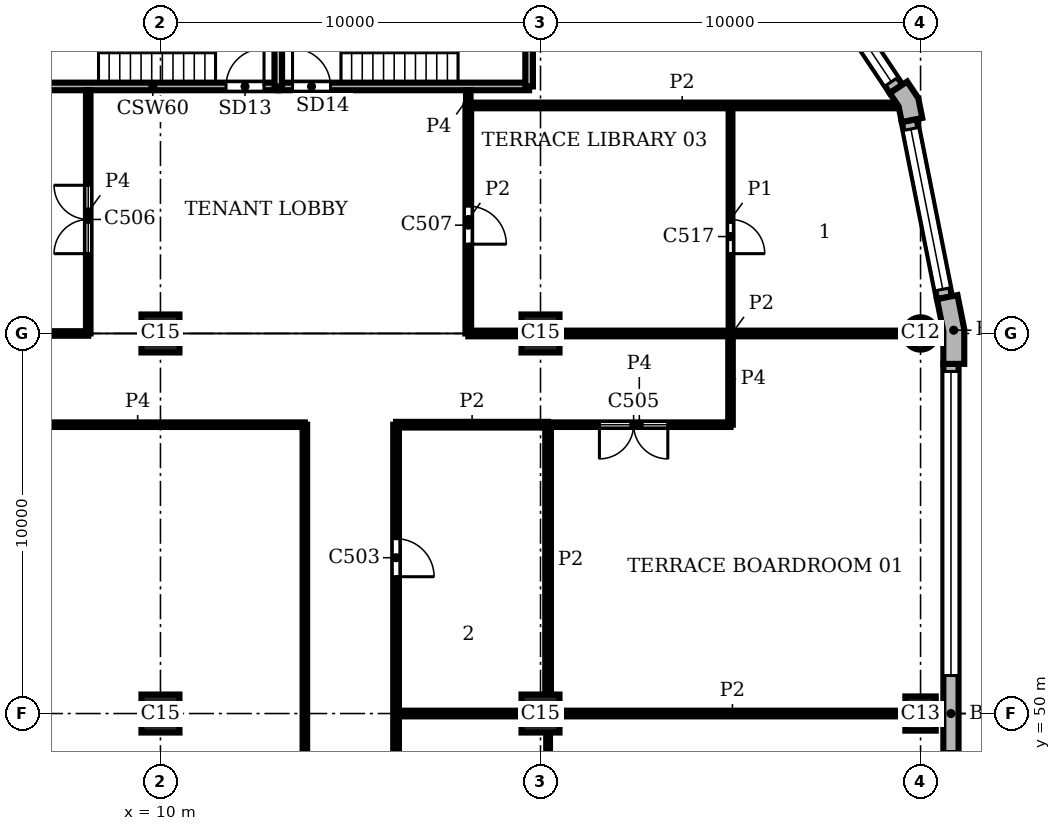
"""IFC4 building model, lengths in metres.
Left out: names, types, materials, properties, quantities, classifications, styles, units other than length and angle.
Written with IfcOpenShell. Run it as: python <this file> out.ifc"""

import sys

from ifc_helpers import new_model, si_unit, direction, frame, frame_2d, origin, origin_2d, place, context, subcontext, project, spatial, polyline, rectangle, circle, outline, extrude, element, fill, save


model = new_model("IFC4")
c1 = context("Model", 3, precision=1e-05, world=origin(), true_north=direction((0.0, 1.0)))
c2 = subcontext(c1, "Body", "Model", "MODEL_VIEW")
j1 = project(units=[si_unit("LENGTHUNIT", "METRE"), si_unit("PLANEANGLEUNIT", "RADIAN")], contexts=[c1])
p1 = place(None, origin())
s1 = spatial("IfcSite", under=j1, at=p1, CompositionType="ELEMENT")
p2 = place(p1, origin())
s2 = spatial("IfcBuilding", under=s1, at=p2, CompositionType="ELEMENT")
p3 = place(p2, frame((0.0, 0.0, 290.4)))
s3 = spatial("IfcBuildingStorey", under=s2, at=p3, CompositionType="ELEMENT", Elevation=290.4)
p4 = place(p3, frame((30.0, 50.0, 0.0), z_axis=(0.0, 0.0, 1.0), x_axis=(0.0, 1.0, 0.0)))
e1 = element("IfcColumn", 1, at=p4, inside=s3, PredefinedType="COLUMN", context=c2, shape_type="SweptSolid", body=[
    extrude(rectangle(XDim=0.9, YDim=0.8, at=origin_2d()), origin(), (0.0, 0.0, 1.0), 3.9),
])
p5 = place(p3, frame((30.0, 60.0, 0.0), z_axis=(0.0, 0.0, 1.0), x_axis=(1.0, 0.0, 0.0)))
e2 = element("IfcColumn", 2, at=p5, inside=s3, PredefinedType="COLUMN", context=c2, shape_type="SweptSolid", body=[
    extrude(circle(Radius=0.425, at=origin_2d()), origin(), (0.0, 0.0, 1.0), 3.9),
])
for number, where, z_axis, x_axis in (
    (3, (10.0, 50.0, 0.0), (0.0, 0.0, 1.0), (1.0, 0.0, 0.0)),
    (4, (10.0, 60.0, 0.0), (0.0, 0.0, 1.0), (1.0, 0.0, 0.0)),
    (5, (20.0, 50.0, 0.0), (0.0, 0.0, 1.0), (1.0, 0.0, 0.0)),
    (6, (20.0, 60.0, 0.0), (0.0, 0.0, 1.0), (1.0, 0.0, 0.0)),
):
    element("IfcColumn", number, at=place(p3, frame(where, z_axis=z_axis, x_axis=x_axis)), inside=s3, PredefinedType="COLUMN", context=c2, shape_type="SweptSolid", body=[
        extrude(rectangle(XDim=1.0, YDim=1.0, at=origin_2d()), origin(), (0.0, 0.0, 1.0), 3.9),
    ])
p6 = place(p3, origin())
e7 = element("IfcWall", 7, at=p6, inside=s3, PredefinedType="SOLIDWALL", context=c2, shape_type="SweptSolid", body=[
    extrude(outline(polyline([(31.0, 59.2), (31.15, 59.2), (31.15, 60.113), (30.972, 61.009), (30.825, 60.98), (30.432, 60.902), (30.6, 60.059), (30.6, 59.2), (31.0, 59.2)])), origin(), (0.0, 0.0, 1.0), 3.9),
])
e8 = element("IfcWall", 8, at=p6, inside=s3, PredefinedType="SOLIDWALL", context=c2, shape_type="SweptSolid", body=[
    extrude(outline(polyline([(29.897, 65.641), (30.045, 65.67), (29.941, 66.189), (29.648, 66.629), (29.523, 66.545), (29.19, 66.323), (29.423, 65.974), (29.505, 65.563), (29.897, 65.641)])), origin(), (0.0, 0.0, 1.0), 3.9),
])
p7 = place(p3, frame((30.8, 40.8, 0.0), z_axis=(0.0, 0.0, 1.0), x_axis=(0.0, 1.0, 0.0)))
e9 = element("IfcWall", 9, at=p7, inside=s3, PredefinedType="SOLIDWALL", context=c2, shape_type="SweptSolid", body=[
    extrude(rectangle(XDim=18.4, YDim=0.4, at=frame_2d((9.2, 0.0))), origin(), (0.0, 0.0, 1.0), 3.9),
])
p8 = place(p7, frame((0.2, 0.0, 0.9)))
e10 = element("IfcOpeningElement", 10, at=p8, cuts=e9, PredefinedType="OPENING", context=c2, shape_type="SweptSolid", body=[
    extrude(rectangle(XDim=8.0, YDim=2.35, at=frame_2d((4.0, 1.175))), frame((0.0, 0.21, 0.0), z_axis=(0.0, -1.0, 0.0), x_axis=(1.0, 0.0, 0.0)), (0.0, 0.0, 1.0), 0.42),
])
p9 = place(p7, frame((10.2, 0.0, 0.9)))
e11 = element("IfcOpeningElement", 11, at=p9, cuts=e9, PredefinedType="OPENING", context=c2, shape_type="SweptSolid", body=[
    extrude(rectangle(XDim=8.0, YDim=2.35, at=frame_2d((4.0, 1.175))), frame((0.0, 0.21, 0.0), z_axis=(0.0, -1.0, 0.0), x_axis=(1.0, 0.0, 0.0)), (0.0, 0.0, 1.0), 0.42),
])
p10 = place(p3, frame((30.629, 60.941, 0.0), z_axis=(0.0, 0.0, 1.0), x_axis=(-0.195098533057, 0.98078364709, 0.0)))
e12 = element("IfcWall", 12, at=p10, inside=s3, PredefinedType="SOLIDWALL", context=c2, shape_type="SweptSolid", body=[
    extrude(rectangle(XDim=4.753, YDim=0.4, at=frame_2d((2.376, 0.0))), origin(), (0.0, 0.0, 1.0), 3.9),
])
p11 = place(p10, frame((0.226, 0.0, 0.9)))
e13 = element("IfcOpeningElement", 13, at=p11, cuts=e12, PredefinedType="OPENING", context=c2, shape_type="SweptSolid", body=[
    extrude(rectangle(XDim=4.3, YDim=2.35, at=frame_2d((2.15, 1.175))), frame((0.0, 0.21, 0.0), z_axis=(0.0, -1.0, 0.0), x_axis=(1.0, 0.0, 0.0)), (0.0, 0.0, 1.0), 0.42),
])
p12 = place(p3, frame((29.357, 66.434, 0.0), z_axis=(0.0, 0.0, 1.0), x_axis=(-0.555541552266, 0.831488775454, 0.0)))
e14 = element("IfcWall", 14, at=p12, inside=s3, PredefinedType="SOLIDWALL", context=c2, shape_type="SweptSolid", body=[
    extrude(rectangle(XDim=4.753, YDim=0.4, at=frame_2d((2.376, 0.0))), origin(), (0.0, 0.0, 1.0), 3.9),
])
p13 = place(p12, frame((0.226, 0.0, 0.9)))
e15 = element("IfcOpeningElement", 15, at=p13, cuts=e14, PredefinedType="OPENING", context=c2, shape_type="SweptSolid", body=[
    extrude(rectangle(XDim=4.3, YDim=2.35, at=frame_2d((2.15, 1.175))), frame((0.0, 0.21, 0.0), z_axis=(0.0, -1.0, 0.0), x_axis=(1.0, 0.0, 0.0)), (0.0, 0.0, 1.0), 0.42),
])
p14 = place(p3, frame((6.5, 66.5, 0.0), z_axis=(0.0, 0.0, 1.0), x_axis=(1.0, 0.0, 0.0)))
e16 = element("IfcWall", 16, at=p14, inside=s3, PredefinedType="SHEAR", context=c2, shape_type="SweptSolid", body=[
    extrude(rectangle(XDim=6.6, YDim=0.2, at=frame_2d((3.3, 0.0))), origin(), (0.0, 0.0, 1.0), 3.58),
])
p15 = place(p14, frame((5.225, 0.0, 0.0)))
e17 = element("IfcOpeningElement", 17, at=p15, cuts=e16, PredefinedType="OPENING", context=c2, shape_type="SweptSolid", body=[
    extrude(rectangle(XDim=1.0, YDim=2.1, at=frame_2d((0.5, 1.05))), frame((0.0, 0.11, 0.0), z_axis=(0.0, -1.0, 0.0), x_axis=(1.0, 0.0, 0.0)), (0.0, 0.0, 1.0), 0.22),
])
p16 = place(p3, frame((13.1, 66.5, 0.0), z_axis=(0.0, 0.0, 1.0), x_axis=(1.0, 0.0, 0.0)))
e18 = element("IfcWall", 18, at=p16, inside=s3, PredefinedType="SHEAR", context=c2, shape_type="SweptSolid", body=[
    extrude(rectangle(XDim=6.6, YDim=0.2, at=frame_2d((3.3, 0.0))), origin(), (0.0, 0.0, 1.0), 3.58),
])
p17 = place(p16, frame((0.375, 0.0, 0.0)))
e19 = element("IfcOpeningElement", 19, at=p17, cuts=e18, PredefinedType="OPENING", context=c2, shape_type="SweptSolid", body=[
    extrude(rectangle(XDim=1.0, YDim=2.1, at=frame_2d((0.5, 1.05))), frame((0.0, 0.11, 0.0), z_axis=(0.0, -1.0, 0.0), x_axis=(1.0, 0.0, 0.0)), (0.0, 0.0, 1.0), 0.22),
])
for number, where, z_axis, x_axis in (
    (20, (13.1, 66.5, 0.0), (0.0, 0.0, 1.0), (0.0, 1.0, 0.0)),
    (21, (19.7, 66.5, 0.0), (0.0, 0.0, 1.0), (0.0, 1.0, 0.0)),
):
    element("IfcWall", number, at=place(p3, frame(where, z_axis=z_axis, x_axis=x_axis)), inside=s3, PredefinedType="SHEAR", context=c2, shape_type="SweptSolid", body=[
        extrude(rectangle(XDim=3.3, YDim=0.2, at=frame_2d((1.65, 0.0))), origin(), (0.0, 0.0, 1.0), 3.58),
    ])
p18 = place(p3, frame((20.2, 40.5, 0.0), z_axis=(0.0, 0.0, 1.0), x_axis=(0.0, 1.0, 0.0)))
e22 = element("IfcWall", 22, at=p18, inside=s3, PredefinedType="PARTITIONING", context=c2, shape_type="SweptSolid", body=[
    extrude(rectangle(XDim=9.0, YDim=0.1, at=frame_2d((4.5, 0.0))), origin(), (0.0, 0.0, 1.0), 3.58),
])
p19 = place(p18, frame((4.9, 0.0, 0.0)))
e23 = element("IfcOpeningElement", 23, at=p19, cuts=e22, PredefinedType="OPENING", context=c2, shape_type="SweptSolid", body=[
    extrude(rectangle(XDim=0.9, YDim=2.1, at=frame_2d((0.45, 1.05))), frame((0.0, 0.06, 0.0), z_axis=(0.0, -1.0, 0.0), x_axis=(1.0, 0.0, 0.0)), (0.0, 0.0, 1.0), 0.12),
])
p20 = place(p3, frame((25.0, 60.0, 0.0), z_axis=(0.0, 0.0, 1.0), x_axis=(0.0, 1.0, 0.0)))
e24 = element("IfcWall", 24, at=p20, inside=s3, PredefinedType="PARTITIONING", context=c2, shape_type="SweptSolid", body=[
    extrude(rectangle(XDim=6.0, YDim=0.1, at=frame_2d((3.0, 0.0))), origin(), (0.0, 0.0, 1.0), 3.58),
])
p21 = place(p20, frame((2.1, 0.0, 0.0)))
e25 = element("IfcOpeningElement", 25, at=p21, cuts=e24, PredefinedType="OPENING", context=c2, shape_type="SweptSolid", body=[
    extrude(rectangle(XDim=0.9, YDim=2.1, at=frame_2d((0.45, 1.05))), frame((0.0, 0.06, 0.0), z_axis=(0.0, -1.0, 0.0), x_axis=(1.0, 0.0, 0.0)), (0.0, 0.0, 1.0), 0.12),
])
p22 = place(p3, frame((16.2, 33.2, 0.0), z_axis=(0.0, 0.0, 1.0), x_axis=(0.0, 1.0, 0.0)))
e26 = element("IfcWall", 26, at=p22, inside=s3, PredefinedType="PARTITIONING", context=c2, shape_type="SweptSolid", body=[
    extrude(rectangle(XDim=24.4, YDim=0.15, at=frame_2d((12.2, 0.0))), origin(), (0.0, 0.0, 1.0), 3.58),
])
p23 = place(p22, frame((20.4, 0.0, 0.0)))
e27 = element("IfcOpeningElement", 27, at=p23, cuts=e26, PredefinedType="OPENING", context=c2, shape_type="SweptSolid", body=[
    extrude(rectangle(XDim=1.0, YDim=2.1, at=frame_2d((0.5, 1.05))), frame((0.0, 0.085, 0.0), z_axis=(0.0, -1.0, 0.0), x_axis=(1.0, 0.0, 0.0)), (0.0, 0.0, 1.0), 0.17),
])
p24 = place(p22, frame((11.65, 0.0, 0.0)))
e28 = element("IfcOpeningElement", 28, at=p24, cuts=e26, PredefinedType="OPENING", context=c2, shape_type="SweptSolid", body=[
    extrude(rectangle(XDim=1.0, YDim=2.1, at=frame_2d((0.5, 1.05))), frame((0.0, 0.085, 0.0), z_axis=(0.0, -1.0, 0.0), x_axis=(1.0, 0.0, 0.0)), (0.0, 0.0, 1.0), 0.17),
])
p25 = place(p3, frame((18.1, 60.0, 0.0), z_axis=(0.0, 0.0, 1.0), x_axis=(0.0, 1.0, 0.0)))
e29 = element("IfcWall", 29, at=p25, inside=s3, PredefinedType="PARTITIONING", context=c2, shape_type="SweptSolid", body=[
    extrude(rectangle(XDim=6.0, YDim=0.15, at=frame_2d((3.0, 0.0))), origin(), (0.0, 0.0, 1.0), 3.58),
])
p26 = place(p25, frame((2.35, 0.0, 0.0)))
e30 = element("IfcOpeningElement", 30, at=p26, cuts=e29, PredefinedType="OPENING", context=c2, shape_type="SweptSolid", body=[
    extrude(rectangle(XDim=1.0, YDim=2.1, at=frame_2d((0.5, 1.05))), frame((0.0, 0.085, 0.0), z_axis=(0.0, -1.0, 0.0), x_axis=(1.0, 0.0, 0.0)), (0.0, 0.0, 1.0), 0.17),
])
p27 = place(p3, frame((20.2, 50.5, 0.0), z_axis=(0.0, 0.0, 1.0), x_axis=(0.0, 1.0, 0.0)))
e31 = element("IfcWall", 31, at=p27, inside=s3, PredefinedType="PARTITIONING", context=c2, shape_type="SweptSolid", body=[
    extrude(rectangle(XDim=7.1, YDim=0.15, at=frame_2d((3.55, 0.0))), origin(), (0.0, 0.0, 1.0), 3.58),
])
p28 = place(p3, frame((16.2, 50.0, 0.0), z_axis=(0.0, 0.0, 1.0), x_axis=(1.0, 0.0, 0.0)))
e32 = element("IfcWall", 32, at=p28, inside=s3, PredefinedType="PARTITIONING", context=c2, shape_type="SweptSolid", body=[
    extrude(rectangle(XDim=3.3, YDim=0.15, at=frame_2d((1.65, 0.0))), origin(), (0.0, 0.0, 1.0), 3.58),
])
p29 = place(p3, frame((20.5, 50.0, 0.0), z_axis=(0.0, 0.0, 1.0), x_axis=(1.0, 0.0, 0.0)))
e33 = element("IfcWall", 33, at=p29, inside=s3, PredefinedType="PARTITIONING", context=c2, shape_type="SweptSolid", body=[
    extrude(rectangle(XDim=9.1, YDim=0.15, at=frame_2d((4.55, 0.0))), origin(), (0.0, 0.0, 1.0), 3.58),
])
p30 = place(p3, frame((16.2, 57.6, 0.0), z_axis=(0.0, 0.0, 1.0), x_axis=(1.0, 0.0, 0.0)))
e34 = element("IfcWall", 34, at=p30, inside=s3, PredefinedType="PARTITIONING", context=c2, shape_type="SweptSolid", body=[
    extrude(rectangle(XDim=4.0, YDim=0.15, at=frame_2d((2.0, 0.0))), origin(), (0.0, 0.0, 1.0), 3.58),
])
p31 = place(p3, frame((18.1, 60.0, 0.0), z_axis=(0.0, 0.0, 1.0), x_axis=(1.0, 0.0, 0.0)))
e35 = element("IfcWall", 35, at=p31, inside=s3, PredefinedType="PARTITIONING", context=c2, shape_type="SweptSolid", body=[
    extrude(rectangle(XDim=1.4, YDim=0.15, at=frame_2d((0.7, 0.0))), origin(), (0.0, 0.0, 1.0), 3.58),
])
p32 = place(p3, frame((20.5, 60.0, 0.0), z_axis=(0.0, 0.0, 1.0), x_axis=(1.0, 0.0, 0.0)))
e36 = element("IfcWall", 36, at=p32, inside=s3, PredefinedType="PARTITIONING", context=c2, shape_type="SweptSolid", body=[
    extrude(rectangle(XDim=9.075, YDim=0.15, at=frame_2d((4.538, 0.0))), origin(), (0.0, 0.0, 1.0), 3.58),
])
p33 = place(p3, frame((18.1, 66.0, 0.0), z_axis=(0.0, 0.0, 1.0), x_axis=(1.0, 0.0, 0.0)))
e37 = element("IfcWall", 37, at=p33, inside=s3, PredefinedType="PARTITIONING", context=c2, shape_type="SweptSolid", body=[
    extrude(rectangle(XDim=11.256, YDim=0.15, at=frame_2d((5.628, 0.0))), origin(), (0.0, 0.0, 1.0), 3.58),
])
p34 = place(p3, frame((8.1, 60.0, 0.0), z_axis=(0.0, 0.0, 1.0), x_axis=(0.0, 1.0, 0.0)))
e38 = element("IfcWall", 38, at=p34, inside=s3, PredefinedType="PARTITIONING", context=c2, shape_type="SweptSolid", body=[
    extrude(rectangle(XDim=6.4, YDim=0.12, at=frame_2d((3.2, 0.0))), origin(), (0.0, 0.0, 1.0), 3.58),
])
p35 = place(p34, frame((2.1, 0.0, 0.0)))
e39 = element("IfcOpeningElement", 39, at=p35, cuts=e38, PredefinedType="OPENING", context=c2, shape_type="SweptSolid", body=[
    extrude(rectangle(XDim=1.8, YDim=2.1, at=frame_2d((0.9, 1.05))), frame((0.0, 0.07, 0.0), z_axis=(0.0, -1.0, 0.0), x_axis=(1.0, 0.0, 0.0)), (0.0, 0.0, 1.0), 0.14),
])
p36 = place(p3, frame((13.8, 30.8, 0.0), z_axis=(0.0, 0.0, 1.0), x_axis=(0.0, 1.0, 0.0)))
e40 = element("IfcWall", 40, at=p36, inside=s3, PredefinedType="PARTITIONING", context=c2, shape_type="SweptSolid", body=[
    extrude(rectangle(XDim=26.8, YDim=0.12, at=frame_2d((13.4, 0.0))), origin(), (0.0, 0.0, 1.0), 3.58),
])
p37 = place(p36, frame((12.1, 0.0, 0.0)))
e41 = element("IfcOpeningElement", 41, at=p37, cuts=e40, PredefinedType="OPENING", context=c2, shape_type="SweptSolid", body=[
    extrude(rectangle(XDim=1.8, YDim=2.1, at=frame_2d((0.9, 1.05))), frame((0.0, 0.07, 0.0), z_axis=(0.0, -1.0, 0.0), x_axis=(1.0, 0.0, 0.0)), (0.0, 0.0, 1.0), 0.14),
])
p38 = place(p3, frame((18.1, 66.0, 0.0), z_axis=(0.0, 0.0, 1.0), x_axis=(0.0, 1.0, 0.0)))
e42 = element("IfcWall", 42, at=p38, inside=s3, PredefinedType="PARTITIONING", context=c2, shape_type="SweptSolid", body=[
    extrude(rectangle(XDim=0.4, YDim=0.12, at=frame_2d((0.2, 0.0))), origin(), (0.0, 0.0, 1.0), 3.58),
])
p39 = place(p3, frame((25.0, 57.6, 0.0), z_axis=(0.0, 0.0, 1.0), x_axis=(0.0, 1.0, 0.0)))
e43 = element("IfcWall", 43, at=p39, inside=s3, PredefinedType="PARTITIONING", context=c2, shape_type="SweptSolid", body=[
    extrude(rectangle(XDim=2.4, YDim=0.12, at=frame_2d((1.2, 0.0))), origin(), (0.0, 0.0, 1.0), 3.58),
])
p40 = place(p3, frame((5.0, 57.6, 0.0), z_axis=(0.0, 0.0, 1.0), x_axis=(1.0, 0.0, 0.0)))
e44 = element("IfcWall", 44, at=p40, inside=s3, PredefinedType="PARTITIONING", context=c2, shape_type="SweptSolid", body=[
    extrude(rectangle(XDim=8.8, YDim=0.12, at=frame_2d((4.4, 0.0))), origin(), (0.0, 0.0, 1.0), 3.58),
])
p41 = place(p3, frame((20.2, 57.6, 0.0), z_axis=(0.0, 0.0, 1.0), x_axis=(1.0, 0.0, 0.0)))
e45 = element("IfcWall", 45, at=p41, inside=s3, PredefinedType="PARTITIONING", context=c2, shape_type="SweptSolid", body=[
    extrude(rectangle(XDim=4.8, YDim=0.12, at=frame_2d((2.4, 0.0))), origin(), (0.0, 0.0, 1.0), 3.58),
])
p42 = place(p41, frame((1.35, 0.0, 0.0)))
e46 = element("IfcOpeningElement", 46, at=p42, cuts=e45, PredefinedType="OPENING", context=c2, shape_type="SweptSolid", body=[
    extrude(rectangle(XDim=1.8, YDim=2.1, at=frame_2d((0.9, 1.05))), frame((0.0, 0.07, 0.0), z_axis=(0.0, -1.0, 0.0), x_axis=(1.0, 0.0, 0.0)), (0.0, 0.0, 1.0), 0.14),
])
p43 = place(p3, frame((5.0, 60.0, 0.0), z_axis=(0.0, 0.0, 1.0), x_axis=(1.0, 0.0, 0.0)))
e47 = element("IfcWall", 47, at=p43, inside=s3, PredefinedType="PARTITIONING", context=c2, shape_type="SweptSolid", body=[
    extrude(rectangle(XDim=3.1, YDim=0.12, at=frame_2d((1.55, 0.0))), origin(), (0.0, 0.0, 1.0), 3.58),
])
p44 = place(p9, origin())
e48 = element("IfcWindow", 48, at=p44, inside=s3, PartitioningType="SINGLE_PANEL", PredefinedType="WINDOW", context=c2, shape_type="SweptSolid", body=[
    extrude(rectangle(XDim=8.0, YDim=2.35, at=frame_2d((4.0, 1.175))), frame((0.0, 0.16, 0.0), z_axis=(0.0, -1.0, 0.0), x_axis=(1.0, 0.0, 0.0)), (0.0, 0.0, 1.0), 0.06),
])
fill(e11, e48)
p45 = place(p11, origin())
e49 = element("IfcWindow", 49, at=p45, inside=s3, PartitioningType="SINGLE_PANEL", PredefinedType="WINDOW", context=c2, shape_type="SweptSolid", body=[
    extrude(rectangle(XDim=4.3, YDim=2.35, at=frame_2d((2.15, 1.175))), frame((0.0, 0.16, 0.0), z_axis=(0.0, -1.0, 0.0), x_axis=(1.0, 0.0, 0.0)), (0.0, 0.0, 1.0), 0.06),
])
fill(e13, e49)
p46 = place(p13, origin())
e50 = element("IfcWindow", 50, at=p46, inside=s3, PartitioningType="SINGLE_PANEL", PredefinedType="WINDOW", context=c2, shape_type="SweptSolid", body=[
    extrude(rectangle(XDim=4.3, YDim=2.35, at=frame_2d((2.15, 1.175))), frame((0.0, 0.16, 0.0), z_axis=(0.0, -1.0, 0.0), x_axis=(1.0, 0.0, 0.0)), (0.0, 0.0, 1.0), 0.06),
])
fill(e15, e50)
p47 = place(p15, origin())
e51 = element("IfcDoor", 51, at=p47, inside=s3, OperationType="SINGLE_SWING_RIGHT", PredefinedType="DOOR", context=c2, shape_type="SweptSolid", body=[
    extrude(rectangle(XDim=1.0, YDim=2.1, at=frame_2d((0.5, 1.05))), frame((0.0, 0.025, 0.0), z_axis=(0.0, -1.0, 0.0), x_axis=(1.0, 0.0, 0.0)), (0.0, 0.0, 1.0), 0.05),
])
fill(e17, e51)
p48 = place(p17, origin())
e52 = element("IfcDoor", 52, at=p48, inside=s3, OperationType="SINGLE_SWING_LEFT", PredefinedType="DOOR", context=c2, shape_type="SweptSolid", body=[
    extrude(rectangle(XDim=1.0, YDim=2.1, at=frame_2d((0.5, 1.05))), frame((0.0, 0.025, 0.0), z_axis=(0.0, -1.0, 0.0), x_axis=(1.0, 0.0, 0.0)), (0.0, 0.0, 1.0), 0.05),
])
fill(e19, e52)
p49 = place(p23, frame((1.0, 0.0, 0.0), z_axis=(0.0, 0.0, 1.0), x_axis=(-1.0, 0.0, 0.0)))
e53 = element("IfcDoor", 53, at=p49, inside=s3, OperationType="SINGLE_SWING_RIGHT", PredefinedType="DOOR", context=c2, shape_type="SweptSolid", body=[
    extrude(rectangle(XDim=1.0, YDim=2.1, at=frame_2d((0.5, 1.05))), frame((0.0, 0.025, 0.0), z_axis=(0.0, -1.0, 0.0), x_axis=(1.0, 0.0, 0.0)), (0.0, 0.0, 1.0), 0.05),
])
fill(e27, e53)
p50 = place(p42, frame((1.8, 0.0, 0.0), z_axis=(0.0, 0.0, 1.0), x_axis=(-1.0, 0.0, 0.0)))
e54 = element("IfcDoor", 54, at=p50, inside=s3, OperationType="DOUBLE_DOOR_SINGLE_SWING", PredefinedType="DOOR", context=c2, shape_type="SweptSolid", body=[
    extrude(rectangle(XDim=1.8, YDim=2.1, at=frame_2d((0.9, 1.05))), frame((0.0, 0.025, 0.0), z_axis=(0.0, -1.0, 0.0), x_axis=(1.0, 0.0, 0.0)), (0.0, 0.0, 1.0), 0.05),
])
fill(e46, e54)
p51 = place(p35, origin())
e55 = element("IfcDoor", 55, at=p51, inside=s3, OperationType="DOUBLE_DOOR_SINGLE_SWING", PredefinedType="DOOR", context=c2, shape_type="SweptSolid", body=[
    extrude(rectangle(XDim=1.8, YDim=2.1, at=frame_2d((0.9, 1.05))), frame((0.0, 0.025, 0.0), z_axis=(0.0, -1.0, 0.0), x_axis=(1.0, 0.0, 0.0)), (0.0, 0.0, 1.0), 0.05),
])
fill(e39, e55)
p52 = place(p26, frame((1.0, 0.0, 0.0), z_axis=(0.0, 0.0, 1.0), x_axis=(-1.0, 0.0, 0.0)))
e56 = element("IfcDoor", 56, at=p52, inside=s3, OperationType="SINGLE_SWING_RIGHT", PredefinedType="DOOR", context=c2, shape_type="SweptSolid", body=[
    extrude(rectangle(XDim=1.0, YDim=2.1, at=frame_2d((0.5, 1.05))), frame((0.0, 0.025, 0.0), z_axis=(0.0, -1.0, 0.0), x_axis=(1.0, 0.0, 0.0)), (0.0, 0.0, 1.0), 0.05),
])
fill(e30, e56)
p53 = place(p21, frame((0.9, 0.0, 0.0), z_axis=(0.0, 0.0, 1.0), x_axis=(-1.0, 0.0, 0.0)))
e57 = element("IfcDoor", 57, at=p53, inside=s3, OperationType="SINGLE_SWING_RIGHT", PredefinedType="DOOR", context=c2, shape_type="SweptSolid", body=[
    extrude(rectangle(XDim=0.9, YDim=2.1, at=frame_2d((0.45, 1.05))), frame((0.0, 0.025, 0.0), z_axis=(0.0, -1.0, 0.0), x_axis=(1.0, 0.0, 0.0)), (0.0, 0.0, 1.0), 0.05),
])
fill(e25, e57)
save(model, sys.argv[1])
